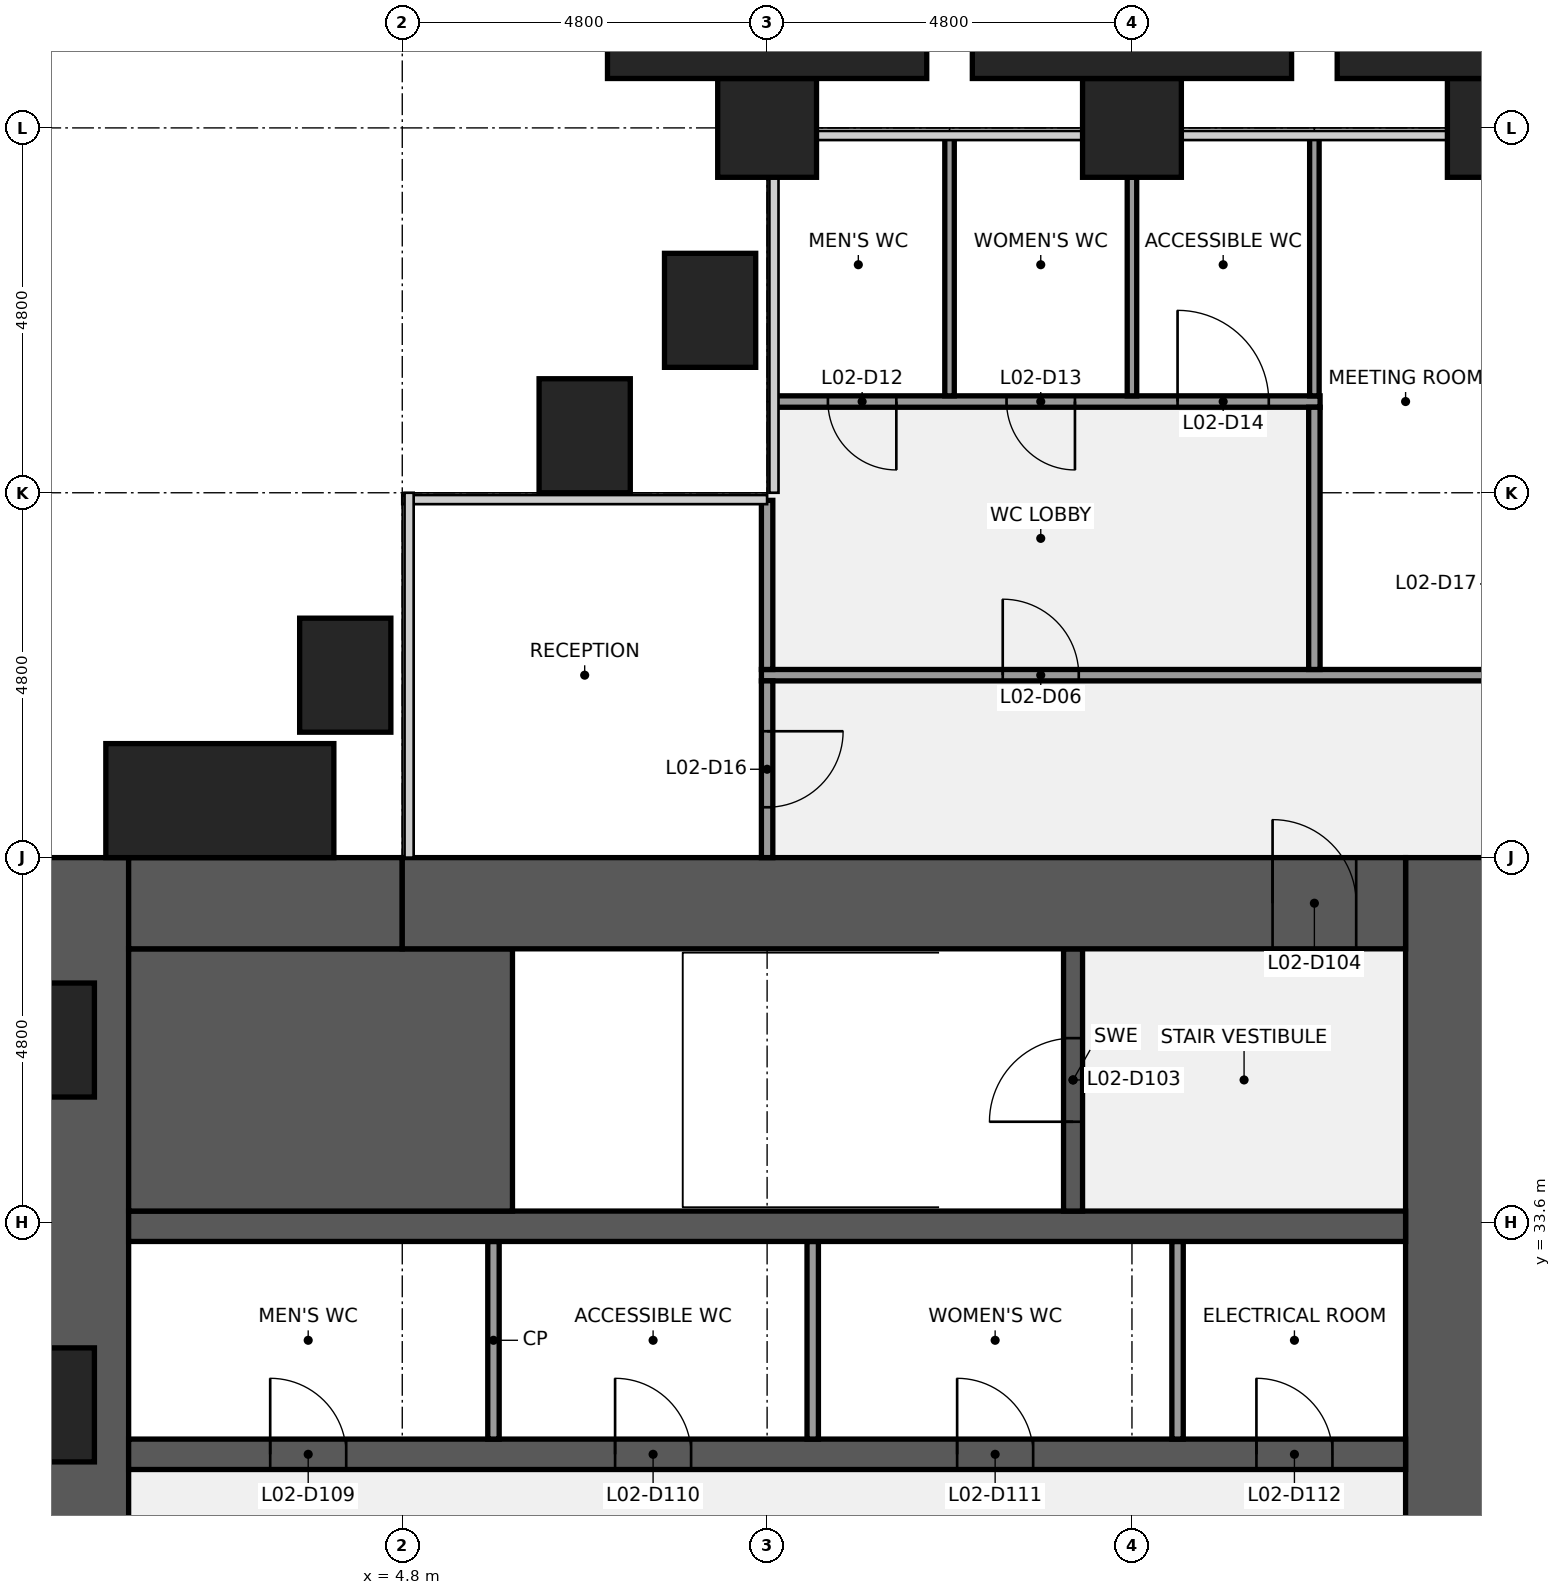
"""IFC4 building model, lengths in metres.
Left out: names, types, materials, properties, quantities, classifications, styles, units other than length and angle.
Written with IfcOpenShell. Run it as: python <this file> out.ifc"""

import sys

from ifc_helpers import new_model, si_unit, direction, frame, frame_2d, origin, origin_2d, place, context, subcontext, project, spatial, rectangle, extrude, element, fill, save


model = new_model("IFC4")
c1 = context("Model", 3, precision=1e-05, world=origin(), true_north=direction((0.0, 1.0)))
c2 = subcontext(c1, "Body", "Model", "MODEL_VIEW")
j1 = project(units=[si_unit("LENGTHUNIT", "METRE"), si_unit("PLANEANGLEUNIT", "RADIAN")], contexts=[c1])
p1 = place(None, origin())
s1 = spatial("IfcSite", under=j1, at=p1, CompositionType="ELEMENT")
p2 = place(p1, origin())
s2 = spatial("IfcBuilding", under=s1, at=p2, CompositionType="ELEMENT")
p3 = place(p2, frame((0.0, 0.0, 17.0)))
s3 = spatial("IfcBuildingStorey", under=s2, at=p3, CompositionType="ELEMENT", Elevation=17.0)
for number, where, z_axis, x_axis in (
    (1, (9.6, 48.0, 0.0), (0.0, 0.0, 1.0), (1.0, 0.0, 0.0)),
    (2, (14.4, 48.0, 0.0), (0.0, 0.0, 1.0), (1.0, 0.0, 0.0)),
    (3, (19.2, 48.0, 0.0), (0.0, 0.0, 1.0), (1.0, 0.0, 0.0)),
):
    element("IfcColumn", number, at=place(p3, frame(where, z_axis=z_axis, x_axis=x_axis)), inside=s3, PredefinedType="COLUMN", context=c2, shape_type="SweptSolid", body=[
        extrude(rectangle(XDim=1.3, YDim=1.3, at=origin_2d()), origin(), (0.0, 0.0, 1.0), 4.4),
    ])
p4 = place(p3, frame((0.6, 9.6, 0.0), z_axis=(0.0, 0.0, 1.0), x_axis=(0.0, 1.0, 0.0)))
e4 = element("IfcWall", 4, at=p4, inside=s3, PredefinedType="SHEAR", context=c2, shape_type="SweptSolid", body=[
    extrude(rectangle(XDim=28.8, YDim=1.2, at=frame_2d((14.4, 0.0))), origin(), (0.0, 0.0, 1.0), 4.24),
])
p5 = place(p4, frame((8.85, 0.0, 0.9)))
e5 = element("IfcOpeningElement", 5, at=p5, cuts=e4, PredefinedType="OPENING", context=c2, shape_type="SweptSolid", body=[
    extrude(rectangle(XDim=1.5, YDim=1.5, at=frame_2d((0.75, 0.75))), frame((0.0, 0.61, 0.0), z_axis=(0.0, -1.0, 0.0), x_axis=(1.0, 0.0, 0.0)), (0.0, 0.0, 1.0), 1.22),
])
p6 = place(p4, frame((18.45, 0.0, 0.9)))
e6 = element("IfcOpeningElement", 6, at=p6, cuts=e4, PredefinedType="OPENING", context=c2, shape_type="SweptSolid", body=[
    extrude(rectangle(XDim=1.5, YDim=1.5, at=frame_2d((0.75, 0.75))), frame((0.0, 0.61, 0.0), z_axis=(0.0, -1.0, 0.0), x_axis=(1.0, 0.0, 0.0)), (0.0, 0.0, 1.0), 1.22),
])
p7 = place(p3, frame((18.6, 38.4, 0.0), z_axis=(0.0, 0.0, 1.0), x_axis=(0.0, -1.0, 0.0)))
e7 = element("IfcWall", 7, at=p7, inside=s3, PredefinedType="SHEAR", context=c2, shape_type="SweptSolid", body=[
    extrude(rectangle(XDim=28.8, YDim=1.2, at=frame_2d((14.4, 0.0))), origin(), (0.0, 0.0, 1.0), 4.24),
])
p8 = place(p7, frame((18.3, 0.0, 0.0)))
e8 = element("IfcOpeningElement", 8, at=p8, cuts=e7, PredefinedType="OPENING", context=c2, shape_type="SweptSolid", body=[
    extrude(rectangle(XDim=1.8, YDim=2.1, at=frame_2d((0.9, 1.05))), frame((0.0, 0.61, 0.0), z_axis=(0.0, -1.0, 0.0), x_axis=(1.0, 0.0, 0.0)), (0.0, 0.0, 1.0), 1.22),
])
p9 = place(p7, frame((8.7, 0.0, 0.0)))
e9 = element("IfcOpeningElement", 9, at=p9, cuts=e7, PredefinedType="OPENING", context=c2, shape_type="SweptSolid", body=[
    extrude(rectangle(XDim=1.8, YDim=2.1, at=frame_2d((0.9, 1.05))), frame((0.0, 0.61, 0.0), z_axis=(0.0, -1.0, 0.0), x_axis=(1.0, 0.0, 0.0)), (0.0, 0.0, 1.0), 1.22),
])
p10 = place(p3, frame((1.2, 30.55, 0.0), z_axis=(0.0, 0.0, 1.0), x_axis=(1.0, 0.0, 0.0)))
e10 = element("IfcWall", 10, at=p10, inside=s3, PredefinedType="SHEAR", context=c2, shape_type="SweptSolid", body=[
    extrude(rectangle(XDim=16.8, YDim=0.4, at=frame_2d((8.4, 0.0))), origin(), (0.0, 0.0, 1.0), 4.24),
])
p11 = place(p10, frame((1.863, 0.0, 0.0)))
e11 = element("IfcOpeningElement", 11, at=p11, cuts=e10, PredefinedType="OPENING", context=c2, shape_type="SweptSolid", body=[
    extrude(rectangle(XDim=1.0, YDim=2.1, at=frame_2d((0.5, 1.05))), frame((0.0, 0.21, 0.0), z_axis=(0.0, -1.0, 0.0), x_axis=(1.0, 0.0, 0.0)), (0.0, 0.0, 1.0), 0.42),
])
p12 = place(p10, frame((6.4, 0.0, 0.0)))
e12 = element("IfcOpeningElement", 12, at=p12, cuts=e10, PredefinedType="OPENING", context=c2, shape_type="SweptSolid", body=[
    extrude(rectangle(XDim=1.0, YDim=2.1, at=frame_2d((0.5, 1.05))), frame((0.0, 0.21, 0.0), z_axis=(0.0, -1.0, 0.0), x_axis=(1.0, 0.0, 0.0)), (0.0, 0.0, 1.0), 0.42),
])
p13 = place(p10, frame((10.9, 0.0, 0.0)))
e13 = element("IfcOpeningElement", 13, at=p13, cuts=e10, PredefinedType="OPENING", context=c2, shape_type="SweptSolid", body=[
    extrude(rectangle(XDim=1.0, YDim=2.1, at=frame_2d((0.5, 1.05))), frame((0.0, 0.21, 0.0), z_axis=(0.0, -1.0, 0.0), x_axis=(1.0, 0.0, 0.0)), (0.0, 0.0, 1.0), 0.42),
])
p14 = place(p10, frame((14.837, 0.0, 0.0)))
e14 = element("IfcOpeningElement", 14, at=p14, cuts=e10, PredefinedType="OPENING", context=c2, shape_type="SweptSolid", body=[
    extrude(rectangle(XDim=1.0, YDim=2.1, at=frame_2d((0.5, 1.05))), frame((0.0, 0.21, 0.0), z_axis=(0.0, -1.0, 0.0), x_axis=(1.0, 0.0, 0.0)), (0.0, 0.0, 1.0), 0.42),
])
for number, where, z_axis, x_axis in (
    (15, (6.0, 30.75, 0.0), (0.0, 0.0, 1.0), (0.0, 1.0, 0.0)),
    (16, (10.2, 30.75, 0.0), (0.0, 0.0, 1.0), (0.0, 1.0, 0.0)),
    (17, (15.0, 30.75, 0.0), (0.0, 0.0, 1.0), (0.0, 1.0, 0.0)),
):
    element("IfcWall", number, at=place(p3, frame(where, z_axis=z_axis, x_axis=x_axis)), inside=s3, PredefinedType="PARTITIONING", context=c2, shape_type="SweptSolid", body=[
        extrude(rectangle(XDim=2.6, YDim=0.15, at=frame_2d((1.3, 0.0))), origin(), (0.0, 0.0, 1.0), 4.24),
    ])
p15 = place(p3, frame((1.2, 33.55, 0.0), z_axis=(0.0, 0.0, 1.0), x_axis=(1.0, 0.0, 0.0)))
e18 = element("IfcWall", 18, at=p15, inside=s3, PredefinedType="SHEAR", context=c2, shape_type="SweptSolid", body=[
    extrude(rectangle(XDim=16.8, YDim=0.4, at=frame_2d((8.4, 0.0))), origin(), (0.0, 0.0, 1.0), 4.24),
])
p16 = place(p3, frame((1.2, 35.475, 0.0), z_axis=(0.0, 0.0, 1.0), x_axis=(1.0, 0.0, 0.0)))
e19 = element("IfcWall", 19, at=p16, inside=s3, PredefinedType="SHEAR", context=c2, shape_type="SweptSolid", body=[
    extrude(rectangle(XDim=5.05, YDim=3.45, at=frame_2d((2.525, 0.0))), origin(), (0.0, 0.0, 1.0), 4.24),
])
p17 = place(p3, frame((13.625, 33.75, 0.0), z_axis=(0.0, 0.0, 1.0), x_axis=(0.0, 1.0, 0.0)))
e20 = element("IfcWall", 20, at=p17, inside=s3, PredefinedType="SHEAR", context=c2, shape_type="SweptSolid", body=[
    extrude(rectangle(XDim=3.45, YDim=0.25, at=frame_2d((1.725, 0.0))), origin(), (0.0, 0.0, 1.0), 4.24),
])
p18 = place(p17, frame((1.175, 0.0, 0.0)))
e21 = element("IfcOpeningElement", 21, at=p18, cuts=e20, PredefinedType="OPENING", context=c2, shape_type="SweptSolid", body=[
    extrude(rectangle(XDim=1.1, YDim=2.1, at=frame_2d((0.55, 1.05))), frame((0.0, 0.135, 0.0), z_axis=(0.0, -1.0, 0.0), x_axis=(1.0, 0.0, 0.0)), (0.0, 0.0, 1.0), 0.27),
])
p19 = place(p3, frame((1.2, 37.8, 0.0), z_axis=(0.0, 0.0, 1.0), x_axis=(1.0, 0.0, 0.0)))
e22 = element("IfcWall", 22, at=p19, inside=s3, PredefinedType="SHEAR", context=c2, shape_type="SweptSolid", body=[
    extrude(rectangle(XDim=3.6, YDim=1.2, at=frame_2d((1.8, 0.0))), origin(), (0.0, 0.0, 1.0), 4.24),
])
p20 = place(p3, frame((4.8, 37.8, 0.0), z_axis=(0.0, 0.0, 1.0), x_axis=(1.0, 0.0, 0.0)))
e23 = element("IfcWall", 23, at=p20, inside=s3, PredefinedType="SHEAR", context=c2, shape_type="SweptSolid", body=[
    extrude(rectangle(XDim=13.2, YDim=1.2, at=frame_2d((6.6, 0.0))), origin(), (0.0, 0.0, 1.0), 4.24),
])
p21 = place(p20, frame((11.45, 0.0, 0.0)))
e24 = element("IfcOpeningElement", 24, at=p21, cuts=e23, PredefinedType="OPENING", context=c2, shape_type="SweptSolid", body=[
    extrude(rectangle(XDim=1.1, YDim=2.1, at=frame_2d((0.55, 1.05))), frame((0.0, 0.61, 0.0), z_axis=(0.0, -1.0, 0.0), x_axis=(1.0, 0.0, 0.0)), (0.0, 0.0, 1.0), 1.22),
])
p22 = place(p3, frame((9.525, 40.8, 0.0), z_axis=(0.0, 0.0, 1.0), x_axis=(1.0, 0.0, 0.0)))
e25 = element("IfcWall", 25, at=p22, inside=s3, PredefinedType="PARTITIONING", context=c2, shape_type="SweptSolid", body=[
    extrude(rectangle(XDim=9.75, YDim=0.15, at=frame_2d((4.875, 0.0))), origin(), (0.0, 0.0, 1.0), 3.25),
])
p23 = place(p22, frame((3.175, 0.0, 0.0)))
e26 = element("IfcOpeningElement", 26, at=p23, cuts=e25, PredefinedType="OPENING", context=c2, shape_type="SweptSolid", body=[
    extrude(rectangle(XDim=1.0, YDim=2.1, at=frame_2d((0.5, 1.05))), frame((0.0, 0.085, 0.0), z_axis=(0.0, -1.0, 0.0), x_axis=(1.0, 0.0, 0.0)), (0.0, 0.0, 1.0), 0.17),
])
p24 = place(p3, frame((9.7, 44.4, 0.0), z_axis=(0.0, 0.0, 1.0), x_axis=(1.0, 0.0, 0.0)))
e27 = element("IfcWall", 27, at=p24, inside=s3, PredefinedType="PARTITIONING", context=c2, shape_type="SweptSolid", body=[
    extrude(rectangle(XDim=7.175, YDim=0.15, at=frame_2d((3.587, 0.0))), origin(), (0.0, 0.0, 1.0), 3.25),
])
p25 = place(p24, frame((0.7, 0.0, 0.0)))
e28 = element("IfcOpeningElement", 28, at=p25, cuts=e27, PredefinedType="OPENING", context=c2, shape_type="SweptSolid", body=[
    extrude(rectangle(XDim=0.9, YDim=2.1, at=frame_2d((0.45, 1.05))), frame((0.0, 0.085, 0.0), z_axis=(0.0, -1.0, 0.0), x_axis=(1.0, 0.0, 0.0)), (0.0, 0.0, 1.0), 0.17),
])
p26 = place(p24, frame((3.05, 0.0, 0.0)))
e29 = element("IfcOpeningElement", 29, at=p26, cuts=e27, PredefinedType="OPENING", context=c2, shape_type="SweptSolid", body=[
    extrude(rectangle(XDim=0.9, YDim=2.1, at=frame_2d((0.45, 1.05))), frame((0.0, 0.085, 0.0), z_axis=(0.0, -1.0, 0.0), x_axis=(1.0, 0.0, 0.0)), (0.0, 0.0, 1.0), 0.17),
])
p27 = place(p24, frame((5.3, 0.0, 0.0)))
e30 = element("IfcOpeningElement", 30, at=p27, cuts=e27, PredefinedType="OPENING", context=c2, shape_type="SweptSolid", body=[
    extrude(rectangle(XDim=1.2, YDim=2.1, at=frame_2d((0.6, 1.05))), frame((0.0, 0.085, 0.0), z_axis=(0.0, -1.0, 0.0), x_axis=(1.0, 0.0, 0.0)), (0.0, 0.0, 1.0), 0.17),
])
p28 = place(p3, frame((9.6, 38.4, 0.0), z_axis=(0.0, 0.0, 1.0), x_axis=(0.0, 1.0, 0.0)))
e31 = element("IfcWall", 31, at=p28, inside=s3, PredefinedType="PARTITIONING", context=c2, shape_type="SweptSolid", body=[
    extrude(rectangle(XDim=2.325, YDim=0.15, at=frame_2d((1.163, 0.0))), origin(), (0.0, 0.0, 1.0), 3.25),
])
p29 = place(p28, frame((0.663, 0.0, 0.0)))
e32 = element("IfcOpeningElement", 32, at=p29, cuts=e31, PredefinedType="OPENING", context=c2, shape_type="SweptSolid", body=[
    extrude(rectangle(XDim=1.0, YDim=2.1, at=frame_2d((0.5, 1.05))), frame((0.0, 0.085, 0.0), z_axis=(0.0, -1.0, 0.0), x_axis=(1.0, 0.0, 0.0)), (0.0, 0.0, 1.0), 0.17),
])
p30 = place(p3, frame((9.6, 40.875, 0.0), z_axis=(0.0, 0.0, 1.0), x_axis=(0.0, 1.0, 0.0)))
e33 = element("IfcWall", 33, at=p30, inside=s3, PredefinedType="PARTITIONING", context=c2, shape_type="SweptSolid", body=[
    extrude(rectangle(XDim=2.225, YDim=0.15, at=frame_2d((1.113, 0.0))), origin(), (0.0, 0.0, 1.0), 3.25),
])
p31 = place(p3, frame((12.0, 44.475, 0.0), z_axis=(0.0, 0.0, 1.0), x_axis=(0.0, 1.0, 0.0)))
e34 = element("IfcWall", 34, at=p31, inside=s3, PredefinedType="PARTITIONING", context=c2, shape_type="SweptSolid", body=[
    extrude(rectangle(XDim=3.425, YDim=0.125, at=frame_2d((1.712, 0.0))), origin(), (0.0, 0.0, 1.0), 3.25),
])
p32 = place(p3, frame((14.4, 44.475, 0.0), z_axis=(0.0, 0.0, 1.0), x_axis=(0.0, 1.0, 0.0)))
e35 = element("IfcWall", 35, at=p32, inside=s3, PredefinedType="PARTITIONING", context=c2, shape_type="SweptSolid", body=[
    extrude(rectangle(XDim=2.875, YDim=0.125, at=frame_2d((1.438, 0.0))), origin(), (0.0, 0.0, 1.0), 3.25),
])
p33 = place(p3, frame((16.8, 44.475, 0.0), z_axis=(0.0, 0.0, 1.0), x_axis=(0.0, 1.0, 0.0)))
e36 = element("IfcWall", 36, at=p33, inside=s3, PredefinedType="PARTITIONING", context=c2, shape_type="SweptSolid", body=[
    extrude(rectangle(XDim=3.425, YDim=0.125, at=frame_2d((1.712, 0.0))), origin(), (0.0, 0.0, 1.0), 3.25),
])
p34 = place(p3, frame((16.8, 40.875, 0.0), z_axis=(0.0, 0.0, 1.0), x_axis=(0.0, 1.0, 0.0)))
e37 = element("IfcWall", 37, at=p34, inside=s3, PredefinedType="PARTITIONING", context=c2, shape_type="SweptSolid", body=[
    extrude(rectangle(XDim=3.45, YDim=0.15, at=frame_2d((1.725, 0.0))), origin(), (0.0, 0.0, 1.0), 3.25),
])
for number, where, z_axis, x_axis in (
    (38, (8.85, 45.6, 0.0), (0.0, 0.0, 1.0), (0.0, 1.0, 0.0)),
    (39, (7.2, 43.95, 0.0), (0.0, 0.0, 1.0), (1.0, 0.0, 0.0)),
    (40, (4.05, 40.8, 0.0), (0.0, 0.0, 1.0), (0.0, 1.0, 0.0)),
):
    element("IfcColumn", number, at=place(p3, frame(where, z_axis=z_axis, x_axis=x_axis)), inside=s3, PredefinedType="PILASTER", context=c2, shape_type="SweptSolid", body=[
        extrude(rectangle(XDim=1.2, YDim=1.5, at=origin_2d()), origin(), (0.0, 0.0, 1.0), 4.4),
    ])
p35 = place(p3, frame((2.4, 39.15, 0.0), z_axis=(0.0, 0.0, 1.0), x_axis=(1.0, 0.0, 0.0)))
e41 = element("IfcColumn", 41, at=p35, inside=s3, PredefinedType="PILASTER", context=c2, shape_type="SweptSolid", body=[
    extrude(rectangle(XDim=3.0, YDim=1.5, at=origin_2d()), origin(), (0.0, 0.0, 1.0), 4.4),
])
for number, where, z_axis, x_axis in (
    (42, (9.6, 49.075, 0.0), (0.0, 0.0, 1.0), (1.0, 0.0, 0.0)),
    (43, (14.4, 49.075, 0.0), (0.0, 0.0, 1.0), (1.0, 0.0, 0.0)),
    (44, (19.2, 49.075, 0.0), (0.0, 0.0, 1.0), (1.0, 0.0, 0.0)),
):
    element("IfcColumn", number, at=place(p3, frame(where, z_axis=z_axis, x_axis=x_axis)), inside=s3, PredefinedType="PILASTER", context=c2, shape_type="SweptSolid", body=[
        extrude(rectangle(XDim=4.2, YDim=0.85, at=origin_2d()), origin(), (0.0, 0.0, 1.0), 4.4),
    ])
p36 = place(p18, origin())
e45 = element("IfcDoor", 45, at=p36, inside=s3, OperationType="SINGLE_SWING_LEFT", PredefinedType="DOOR", context=c2, shape_type="SweptSolid", body=[
    extrude(rectangle(XDim=1.1, YDim=2.1, at=frame_2d((0.55, 1.05))), frame((0.0, 0.025, 0.0), z_axis=(0.0, -1.0, 0.0), x_axis=(1.0, 0.0, 0.0)), (0.0, 0.0, 1.0), 0.05),
])
fill(e21, e45)
p37 = place(p21, origin())
e46 = element("IfcDoor", 46, at=p37, inside=s3, OperationType="SINGLE_SWING_LEFT", PredefinedType="DOOR", context=c2, shape_type="SweptSolid", body=[
    extrude(rectangle(XDim=1.1, YDim=2.1, at=frame_2d((0.55, 1.05))), frame((0.0, 0.025, 0.0), z_axis=(0.0, -1.0, 0.0), x_axis=(1.0, 0.0, 0.0)), (0.0, 0.0, 1.0), 0.05),
])
fill(e24, e46)
p38 = place(p11, origin())
e47 = element("IfcDoor", 47, at=p38, inside=s3, OperationType="SINGLE_SWING_LEFT", PredefinedType="DOOR", context=c2, shape_type="SweptSolid", body=[
    extrude(rectangle(XDim=1.0, YDim=2.1, at=frame_2d((0.5, 1.05))), frame((0.0, 0.025, 0.0), z_axis=(0.0, -1.0, 0.0), x_axis=(1.0, 0.0, 0.0)), (0.0, 0.0, 1.0), 0.05),
])
fill(e11, e47)
p39 = place(p12, origin())
e48 = element("IfcDoor", 48, at=p39, inside=s3, OperationType="SINGLE_SWING_LEFT", PredefinedType="DOOR", context=c2, shape_type="SweptSolid", body=[
    extrude(rectangle(XDim=1.0, YDim=2.1, at=frame_2d((0.5, 1.05))), frame((0.0, 0.025, 0.0), z_axis=(0.0, -1.0, 0.0), x_axis=(1.0, 0.0, 0.0)), (0.0, 0.0, 1.0), 0.05),
])
fill(e12, e48)
p40 = place(p13, origin())
e49 = element("IfcDoor", 49, at=p40, inside=s3, OperationType="SINGLE_SWING_LEFT", PredefinedType="DOOR", context=c2, shape_type="SweptSolid", body=[
    extrude(rectangle(XDim=1.0, YDim=2.1, at=frame_2d((0.5, 1.05))), frame((0.0, 0.025, 0.0), z_axis=(0.0, -1.0, 0.0), x_axis=(1.0, 0.0, 0.0)), (0.0, 0.0, 1.0), 0.05),
])
fill(e13, e49)
p41 = place(p14, origin())
e50 = element("IfcDoor", 50, at=p41, inside=s3, OperationType="SINGLE_SWING_LEFT", PredefinedType="DOOR", context=c2, shape_type="SweptSolid", body=[
    extrude(rectangle(XDim=1.0, YDim=2.1, at=frame_2d((0.5, 1.05))), frame((0.0, 0.025, 0.0), z_axis=(0.0, -1.0, 0.0), x_axis=(1.0, 0.0, 0.0)), (0.0, 0.0, 1.0), 0.05),
])
fill(e14, e50)
p42 = place(p23, origin())
e51 = element("IfcDoor", 51, at=p42, inside=s3, OperationType="SINGLE_SWING_LEFT", PredefinedType="DOOR", context=c2, shape_type="SweptSolid", body=[
    extrude(rectangle(XDim=1.0, YDim=2.1, at=frame_2d((0.5, 1.05))), frame((0.0, 0.025, 0.0), z_axis=(0.0, -1.0, 0.0), x_axis=(1.0, 0.0, 0.0)), (0.0, 0.0, 1.0), 0.05),
])
fill(e26, e51)
p43 = place(p25, origin())
e52 = element("IfcDoor", 52, at=p43, inside=s3, OperationType="SINGLE_SWING_RIGHT", PredefinedType="DOOR", context=c2, shape_type="SweptSolid", body=[
    extrude(rectangle(XDim=0.9, YDim=2.1, at=frame_2d((0.45, 1.05))), frame((0.0, 0.025, 0.0), z_axis=(0.0, -1.0, 0.0), x_axis=(1.0, 0.0, 0.0)), (0.0, 0.0, 1.0), 0.05),
])
fill(e28, e52)
p44 = place(p26, origin())
e53 = element("IfcDoor", 53, at=p44, inside=s3, OperationType="SINGLE_SWING_RIGHT", PredefinedType="DOOR", context=c2, shape_type="SweptSolid", body=[
    extrude(rectangle(XDim=0.9, YDim=2.1, at=frame_2d((0.45, 1.05))), frame((0.0, 0.025, 0.0), z_axis=(0.0, -1.0, 0.0), x_axis=(1.0, 0.0, 0.0)), (0.0, 0.0, 1.0), 0.05),
])
fill(e29, e53)
p45 = place(p27, origin())
e54 = element("IfcDoor", 54, at=p45, inside=s3, OperationType="SINGLE_SWING_LEFT", PredefinedType="DOOR", context=c2, shape_type="SweptSolid", body=[
    extrude(rectangle(XDim=1.2, YDim=2.1, at=frame_2d((0.6, 1.05))), frame((0.0, 0.025, 0.0), z_axis=(0.0, -1.0, 0.0), x_axis=(1.0, 0.0, 0.0)), (0.0, 0.0, 1.0), 0.05),
])
fill(e30, e54)
p46 = place(p29, origin())
e55 = element("IfcDoor", 55, at=p46, inside=s3, OperationType="SINGLE_SWING_RIGHT", PredefinedType="DOOR", context=c2, shape_type="SweptSolid", body=[
    extrude(rectangle(XDim=1.0, YDim=2.1, at=frame_2d((0.5, 1.05))), frame((0.0, 0.025, 0.0), z_axis=(0.0, -1.0, 0.0), x_axis=(1.0, 0.0, 0.0)), (0.0, 0.0, 1.0), 0.05),
])
fill(e32, e55)
save(model, sys.argv[1])
